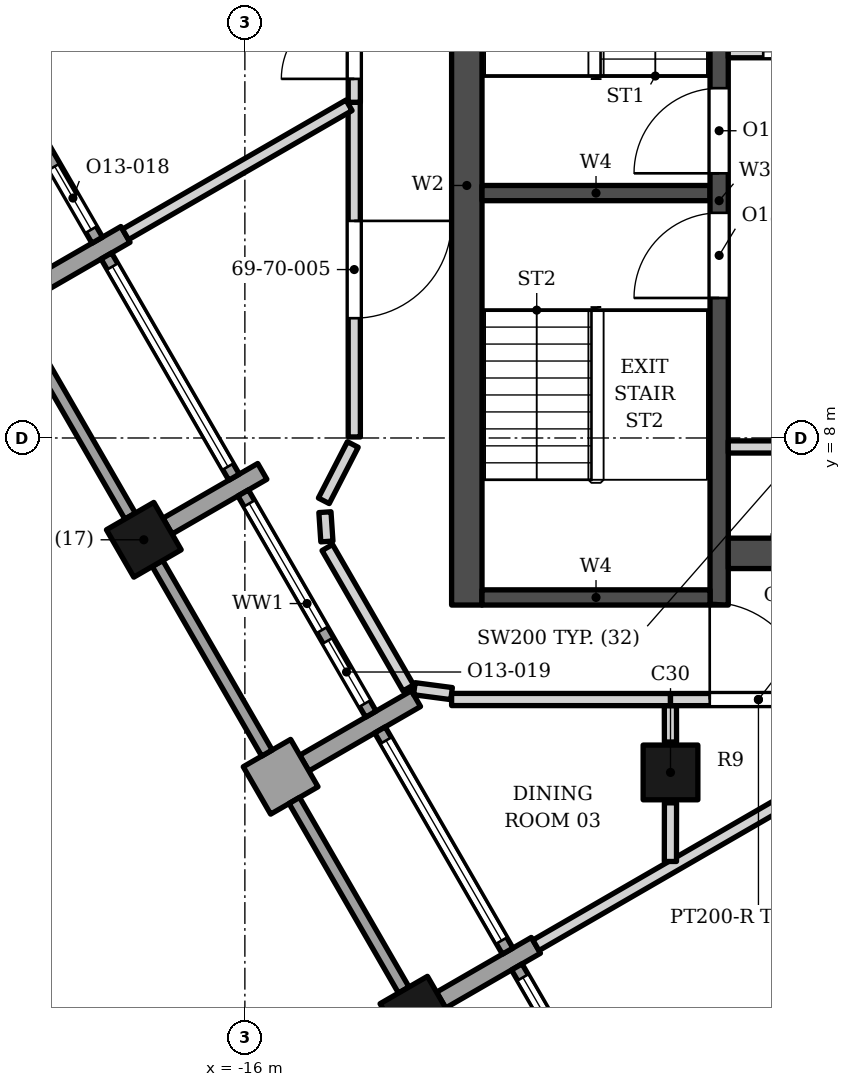
"""IFC4 building model, lengths in metres.
Left out: names, types, materials, properties, quantities, classifications, styles, units other than length and angle.
Written with IfcOpenShell. Run it as: python <this file> out.ifc"""

import sys

from ifc_helpers import new_model, si_unit, direction, frame, frame_2d, origin, origin_2d, place, context, subcontext, project, spatial, rectangle, extrude, element, fill, save


model = new_model("IFC4")
c1 = context("Model", 3, precision=1e-05, world=origin(), true_north=direction((0.0, 1.0)))
c2 = subcontext(c1, "Body", "Model", "MODEL_VIEW")
j1 = project(units=[si_unit("LENGTHUNIT", "METRE"), si_unit("PLANEANGLEUNIT", "RADIAN")], contexts=[c1])
p1 = place(None, origin())
s1 = spatial("IfcSite", under=j1, at=p1, CompositionType="ELEMENT")
p2 = place(p1, origin())
s2 = spatial("IfcBuilding", under=s1, at=p2, CompositionType="ELEMENT")
p3 = place(p2, frame((0.0, 0.0, 287.2)))
s3 = spatial("IfcBuildingStorey", under=s2, at=p3, CompositionType="ELEMENT", Elevation=287.2)
p4 = place(p3, frame((-12.35, 5.253, 0.0), z_axis=(0.0, 0.0, 1.0), x_axis=(0.0, 1.0, 0.0)))
e1 = element("IfcWall", 1, at=p4, inside=s3, PredefinedType="SHEAR", context=c2, shape_type="SweptSolid", body=[
    extrude(rectangle(XDim=13.8, YDim=0.5, at=frame_2d((6.9, 0.0))), origin(), (0.0, 0.0, 1.0), 3.9),
])
p5 = place(p3, frame((-8.2, 5.253, 0.0), z_axis=(0.0, 0.0, 1.0), x_axis=(0.0, 1.0, 0.0)))
e2 = element("IfcWall", 2, at=p5, inside=s3, PredefinedType="SHEAR", context=c2, shape_type="SweptSolid", body=[
    extrude(rectangle(XDim=13.3, YDim=0.3, at=frame_2d((6.65, 0.0))), origin(), (0.0, 0.0, 1.0), 3.9),
])
p6 = place(p5, frame((7.1, 0.0, 0.0)))
e3 = element("IfcOpeningElement", 3, at=p6, cuts=e2, PredefinedType="OPENING", context=c2, shape_type="SweptSolid", body=[
    extrude(rectangle(XDim=1.4, YDim=2.1, at=frame_2d((0.7, 1.05))), frame((0.0, 0.16, 0.0), z_axis=(0.0, -1.0, 0.0), x_axis=(1.0, 0.0, 0.0)), (0.0, 0.0, 1.0), 0.32),
])
p7 = place(p5, frame((5.05, 0.0, 0.0)))
e4 = element("IfcOpeningElement", 4, at=p7, cuts=e2, PredefinedType="OPENING", context=c2, shape_type="SweptSolid", body=[
    extrude(rectangle(XDim=1.4, YDim=2.1, at=frame_2d((0.7, 1.05))), frame((0.0, 0.16, 0.0), z_axis=(0.0, -1.0, 0.0), x_axis=(1.0, 0.0, 0.0)), (0.0, 0.0, 1.0), 0.32),
])
for number, where, z_axis, x_axis in (
    (5, (-12.1, 12.028, 0.0), (0.0, 0.0, 1.0), (1.0, 0.0, 0.0)),
    (6, (-12.1, 5.378, 0.0), (0.0, 0.0, 1.0), (1.0, 0.0, 0.0)),
):
    element("IfcWall", number, at=place(p3, frame(where, z_axis=z_axis, x_axis=x_axis)), inside=s3, PredefinedType="SHEAR", context=c2, shape_type="SweptSolid", body=[
        extrude(rectangle(XDim=3.75, YDim=0.25, at=frame_2d((1.875, 0.0))), origin(), (0.0, 0.0, 1.0), 3.9),
    ])
p8 = place(p3, frame((-8.05, 6.103, 0.0), z_axis=(0.0, 0.0, 1.0), x_axis=(1.0, 0.0, 0.0)))
e7 = element("IfcWall", 7, at=p8, inside=s3, PredefinedType="SHEAR", context=c2, shape_type="SweptSolid", body=[
    extrude(rectangle(XDim=7.05, YDim=0.5, at=frame_2d((3.525, 0.0))), origin(), (0.0, 0.0, 1.0), 3.9),
])
p9 = place(p8, frame((0.825, 0.0, 0.0)))
e8 = element("IfcOpeningElement", 8, at=p9, cuts=e7, PredefinedType="OPENING", context=c2, shape_type="SweptSolid", body=[
    extrude(rectangle(XDim=0.9, YDim=2.1, at=frame_2d((0.45, 1.05))), frame((0.0, 0.26, 0.0), z_axis=(0.0, -1.0, 0.0), x_axis=(1.0, 0.0, 0.0)), (0.0, 0.0, 1.0), 0.52),
])
for number, where, z_axis, x_axis in (
    (9, (-9.0, 2.5, 0.0), (0.0, 0.0, 1.0), (1.0, 0.0, 0.0)),
    (10, (-17.662, 6.326, 0.0), (0.0, 0.0, 1.0), (0.5, -0.866, 0.0)),
    (11, (-13.162, -1.468, 0.0), (0.0, 0.0, 1.0), (0.5, -0.866, 0.0)),
):
    element("IfcColumn", number, at=place(p3, frame(where, z_axis=z_axis, x_axis=x_axis)), inside=s3, PredefinedType="COLUMN", context=c2, shape_type="SweptSolid", body=[
        extrude(rectangle(XDim=0.9, YDim=0.9, at=origin_2d()), origin(), (0.0, 0.0, 1.0), 3.9),
    ])
p10 = place(p3, frame((-17.963, 11.348, 0.0), z_axis=(0.0, 0.0, 1.0), x_axis=(-0.866047807691, -0.499961193289, 0.0)))
e12 = element("IfcWall", 12, at=p10, inside=s3, PredefinedType="SOLIDWALL", context=c2, shape_type="SweptSolid", body=[
    extrude(rectangle(XDim=1.8, YDim=0.3, at=frame_2d((0.9, 0.0))), origin(), (0.0, 0.0, 1.0), 3.0),
])
p11 = place(p3, frame((-17.272, 6.551, 0.0), z_axis=(0.0, 0.0, 1.0), x_axis=(0.865989075817, 0.500062916607, 0.0)))
e13 = element("IfcWall", 13, at=p11, inside=s3, PredefinedType="SOLIDWALL", context=c2, shape_type="SweptSolid", body=[
    extrude(rectangle(XDim=1.8, YDim=0.3, at=frame_2d((0.9, 0.0))), origin(), (0.0, 0.0, 1.0), 2.95),
])
p12 = place(p3, frame((-15.022, 2.654, 0.0), z_axis=(0.0, 0.0, 1.0), x_axis=(-0.865896406789, -0.500223362819, 0.0)))
e14 = element("IfcWall", 14, at=p12, inside=s3, PredefinedType="SOLIDWALL", context=c2, shape_type="SweptSolid", body=[
    extrude(rectangle(XDim=0.9, YDim=0.9, at=frame_2d((0.45, 0.0))), origin(), (0.0, 0.0, 1.0), 3.0),
])
p13 = place(p3, frame((-13.186, 3.714, 0.0), z_axis=(0.0, 0.0, 1.0), x_axis=(-0.866059014716, -0.499941779639, 0.0)))
e15 = element("IfcWall", 15, at=p13, inside=s3, PredefinedType="SOLIDWALL", context=c2, shape_type="SweptSolid", body=[
    extrude(rectangle(XDim=2.12, YDim=0.3, at=frame_2d((1.06, 0.0))), origin(), (0.0, 0.0, 1.0), 3.0),
])
p14 = place(p3, frame((-12.772, -1.243, 0.0), z_axis=(0.0, 0.0, 1.0), x_axis=(0.866013897511, 0.50001992892, 0.0)))
e16 = element("IfcWall", 16, at=p14, inside=s3, PredefinedType="SOLIDWALL", context=c2, shape_type="SweptSolid", body=[
    extrude(rectangle(XDim=1.8, YDim=0.3, at=frame_2d((0.9, 0.0))), origin(), (0.0, 0.0, 1.0), 3.0),
])
p15 = place(p3, frame((-20.528, 14.89, 0.0), z_axis=(0.0, 0.0, 1.0), x_axis=(0.500027713859, -0.866009402589, 0.0)))
e17 = element("IfcWall", 17, at=p15, inside=s3, PredefinedType="ELEMENTEDWALL", context=c2, shape_type="SweptSolid", body=[
    extrude(rectangle(XDim=4.2, YDim=0.2, at=frame_2d((2.1, 0.0))), origin(), (0.0, 0.0, 1.0), 3.0),
])
p16 = place(p15, frame((0.2, 0.0, 0.45)))
e18 = element("IfcOpeningElement", 18, at=p16, cuts=e17, PredefinedType="OPENING", context=c2, shape_type="SweptSolid", body=[
    extrude(rectangle(XDim=2.4, YDim=2.25, at=frame_2d((1.2, 1.125))), frame((0.0, 0.11, 0.0), z_axis=(0.0, -1.0, 0.0), x_axis=(1.0, 0.0, 0.0)), (0.0, 0.0, 1.0), 0.22),
])
p17 = place(p15, frame((2.8, 0.0, 0.0)))
e19 = element("IfcOpeningElement", 19, at=p17, cuts=e17, PredefinedType="OPENING", context=c2, shape_type="SweptSolid", body=[
    extrude(rectangle(XDim=1.2, YDim=2.7, at=frame_2d((0.6, 1.35))), frame((0.0, 0.11, 0.0), z_axis=(0.0, -1.0, 0.0), x_axis=(1.0, 0.0, 0.0)), (0.0, 0.0, 1.0), 0.22),
])
p18 = place(p3, frame((-19.687, 9.833, 0.0), z_axis=(0.0, 0.0, 1.0), x_axis=(0.499961193289, -0.866047807691, 0.0)))
e20 = element("IfcWall", 20, at=p18, inside=s3, PredefinedType="SOLIDWALL", context=c2, shape_type="SweptSolid", body=[
    extrude(rectangle(XDim=3.6, YDim=0.2, at=frame_2d((1.8, 0.0))), origin(), (0.0, 0.0, 1.0), 3.0),
])
p19 = place(p3, frame((-18.278, 10.993, 0.0), z_axis=(0.0, 0.0, 1.0), x_axis=(0.500002543286, -0.866023935413, 0.0)))
e21 = element("IfcWall", 21, at=p19, inside=s3, PredefinedType="ELEMENTEDWALL", context=c2, shape_type="SweptSolid", body=[
    extrude(rectangle(XDim=4.2, YDim=0.2, at=frame_2d((2.1, 0.0))), origin(), (0.0, 0.0, 1.0), 3.0),
])
p20 = place(p19, frame((0.2, 0.0, 0.45)))
e22 = element("IfcOpeningElement", 22, at=p20, cuts=e21, PredefinedType="OPENING", context=c2, shape_type="SweptSolid", body=[
    extrude(rectangle(XDim=3.8, YDim=2.25, at=frame_2d((1.9, 1.125))), frame((0.0, 0.11, 0.0), z_axis=(0.0, -1.0, 0.0), x_axis=(1.0, 0.0, 0.0)), (0.0, 0.0, 1.0), 0.22),
])
p21 = place(p3, frame((-17.437, 5.936, 0.0), z_axis=(0.0, 0.0, 1.0), x_axis=(0.499961193289, -0.866047807691, 0.0)))
e23 = element("IfcWall", 23, at=p21, inside=s3, PredefinedType="SOLIDWALL", context=c2, shape_type="SweptSolid", body=[
    extrude(rectangle(XDim=3.6, YDim=0.2, at=frame_2d((1.8, 0.0))), origin(), (0.0, 0.0, 1.0), 3.0),
])
p22 = place(p3, frame((-16.028, 7.096, 0.0), z_axis=(0.0, 0.0, 1.0), x_axis=(0.500027713859, -0.866009402589, 0.0)))
e24 = element("IfcWall", 24, at=p22, inside=s3, PredefinedType="ELEMENTEDWALL", context=c2, shape_type="SweptSolid", body=[
    extrude(rectangle(XDim=4.2, YDim=0.2, at=frame_2d((2.1, 0.0))), origin(), (0.0, 0.0, 1.0), 2.95),
])
p23 = place(p22, frame((0.2, 0.0, 0.45)))
e25 = element("IfcOpeningElement", 25, at=p23, cuts=e24, PredefinedType="OPENING", context=c2, shape_type="SweptSolid", body=[
    extrude(rectangle(XDim=2.4, YDim=2.25, at=frame_2d((1.2, 1.125))), frame((0.0, 0.11, 0.0), z_axis=(0.0, -1.0, 0.0), x_axis=(1.0, 0.0, 0.0)), (0.0, 0.0, 1.0), 0.22),
])
p24 = place(p22, frame((2.8, 0.0, 0.0)))
e26 = element("IfcOpeningElement", 26, at=p24, cuts=e24, PredefinedType="OPENING", context=c2, shape_type="SweptSolid", body=[
    extrude(rectangle(XDim=1.2, YDim=2.7, at=frame_2d((0.6, 1.35))), frame((0.0, 0.11, 0.0), z_axis=(0.0, -1.0, 0.0), x_axis=(1.0, 0.0, 0.0)), (0.0, 0.0, 1.0), 0.22),
])
p25 = place(p3, frame((-15.187, 2.039, 0.0), z_axis=(0.0, 0.0, 1.0), x_axis=(0.499961193289, -0.866047807691, 0.0)))
e27 = element("IfcWall", 27, at=p25, inside=s3, PredefinedType="SOLIDWALL", context=c2, shape_type="SweptSolid", body=[
    extrude(rectangle(XDim=3.6, YDim=0.2, at=frame_2d((1.8, 0.0))), origin(), (0.0, 0.0, 1.0), 3.0),
])
p26 = place(p3, frame((-13.778, 3.199, 0.0), z_axis=(0.0, 0.0, 1.0), x_axis=(0.500027713859, -0.866009402589, 0.0)))
e28 = element("IfcWall", 28, at=p26, inside=s3, PredefinedType="ELEMENTEDWALL", context=c2, shape_type="SweptSolid", body=[
    extrude(rectangle(XDim=4.2, YDim=0.2, at=frame_2d((2.1, 0.0))), origin(), (0.0, 0.0, 1.0), 3.0),
])
p27 = place(p26, frame((0.2, 0.0, 0.45)))
e29 = element("IfcOpeningElement", 29, at=p27, cuts=e28, PredefinedType="OPENING", context=c2, shape_type="SweptSolid", body=[
    extrude(rectangle(XDim=3.8, YDim=2.25, at=frame_2d((1.9, 1.125))), frame((0.0, 0.11, 0.0), z_axis=(0.0, -1.0, 0.0), x_axis=(1.0, 0.0, 0.0)), (0.0, 0.0, 1.0), 0.22),
])
p28 = place(p3, frame((-11.528, -0.698, 0.0), z_axis=(0.0, 0.0, 1.0), x_axis=(0.500002543286, -0.866023935413, 0.0)))
e30 = element("IfcWall", 30, at=p28, inside=s3, PredefinedType="ELEMENTEDWALL", context=c2, shape_type="SweptSolid", body=[
    extrude(rectangle(XDim=4.2, YDim=0.2, at=frame_2d((2.1, 0.0))), origin(), (0.0, 0.0, 1.0), 3.0),
])
p29 = place(p28, frame((0.2, 0.0, 0.45)))
e31 = element("IfcOpeningElement", 31, at=p29, cuts=e30, PredefinedType="OPENING", context=c2, shape_type="SweptSolid", body=[
    extrude(rectangle(XDim=2.4, YDim=2.25, at=frame_2d((1.2, 1.125))), frame((0.0, 0.11, 0.0), z_axis=(0.0, -1.0, 0.0), x_axis=(1.0, 0.0, 0.0)), (0.0, 0.0, 1.0), 0.22),
])
p30 = place(p28, frame((2.8, 0.0, 0.0)))
e32 = element("IfcOpeningElement", 32, at=p30, cuts=e30, PredefinedType="OPENING", context=c2, shape_type="SweptSolid", body=[
    extrude(rectangle(XDim=1.2, YDim=2.7, at=frame_2d((0.6, 1.35))), frame((0.0, 0.11, 0.0), z_axis=(0.0, -1.0, 0.0), x_axis=(1.0, 0.0, 0.0)), (0.0, 0.0, 1.0), 0.22),
])
p31 = place(p3, frame((-8.05, 7.853, 0.0), z_axis=(0.0, 0.0, 1.0), x_axis=(1.0, 0.0, 0.0)))
e33 = element("IfcWall", 33, at=p31, inside=s3, PredefinedType="SOLIDWALL", context=c2, shape_type="SweptSolid", body=[
    extrude(rectangle(XDim=2.5, YDim=0.2, at=frame_2d((1.25, 0.0))), origin(), (0.0, 0.0, 1.0), 3.73),
])
p32 = place(p3, frame((-8.05, 14.353, 0.0), z_axis=(0.0, 0.0, 1.0), x_axis=(1.0, 0.0, 0.0)))
e34 = element("IfcWall", 34, at=p32, inside=s3, PredefinedType="SOLIDWALL", context=c2, shape_type="SweptSolid", body=[
    extrude(rectangle(XDim=2.35, YDim=0.2, at=frame_2d((1.175, 0.0))), origin(), (0.0, 0.0, 1.0), 3.73),
])
p33 = place(p32, frame((0.575, 0.0, 0.0)))
e35 = element("IfcOpeningElement", 35, at=p33, cuts=e34, PredefinedType="OPENING", context=c2, shape_type="SweptSolid", body=[
    extrude(rectangle(XDim=1.2, YDim=2.1, at=frame_2d((0.6, 1.05))), frame((0.0, 0.11, 0.0), z_axis=(0.0, -1.0, 0.0), x_axis=(1.0, 0.0, 0.0)), (0.0, 0.0, 1.0), 0.22),
])
p34 = place(p3, frame((-11.214, -0.343, 0.0), z_axis=(0.0, 0.0, 1.0), x_axis=(0.86573436217, 0.500503760384, 0.0)))
e36 = element("IfcWall", 36, at=p34, inside=s3, PredefinedType="PARTITIONING", context=c2, shape_type="SweptSolid", body=[
    extrude(rectangle(XDim=7.05, YDim=0.2, at=frame_2d((3.525, 0.0))), origin(), (0.0, 0.0, 1.0), 2.742),
])
p35 = place(p3, frame((-9.002, 1.036, 0.0), z_axis=(0.0, 0.0, 1.0), x_axis=(0.001518985589, 0.999998846341, 0.0)))
e37 = element("IfcWall", 37, at=p35, inside=s3, PredefinedType="PARTITIONING", context=c2, shape_type="SweptSolid", body=[
    extrude(rectangle(XDim=0.964, YDim=0.2, at=frame_2d((0.482, 0.0))), origin(), (0.0, 0.0, 1.0), 3.128),
])
p36 = place(p3, frame((-9.002, 3.6, 0.0), z_axis=(0.0, 0.0, 1.0), x_axis=(0.002442989453, -0.999997015897, 0.0)))
e38 = element("IfcWall", 38, at=p36, inside=s3, PredefinedType="PARTITIONING", context=c2, shape_type="SweptSolid", body=[
    extrude(rectangle(XDim=0.6, YDim=0.2, at=frame_2d((0.3, 0.0))), origin(), (0.0, 0.0, 1.0), 3.332),
])
p37 = place(p3, frame((-12.6, 3.699, 0.0), z_axis=(0.0, 0.0, 1.0), x_axis=(0.999999917209, -0.000406917565, 0.0)))
e39 = element("IfcWall", 39, at=p37, inside=s3, PredefinedType="PARTITIONING", context=c2, shape_type="SweptSolid", body=[
    extrude(rectangle(XDim=3.6, YDim=0.2, at=frame_2d((1.8, 0.0))), origin(), (0.0, 0.0, 1.0), 3.73),
])
p38 = place(p3, frame((-9.0, 3.698, 0.0), z_axis=(0.0, 0.0, 1.0), x_axis=(0.999999871794, 0.000506371781, 0.0)))
e40 = element("IfcWall", 40, at=p38, inside=s3, PredefinedType="PARTITIONING", context=c2, shape_type="SweptSolid", body=[
    extrude(rectangle(XDim=2.893, YDim=0.2, at=frame_2d((1.446, 0.0))), origin(), (0.0, 0.0, 1.0), 3.73),
])
p39 = place(p38, frame((0.646, 0.0, 0.0)))
e41 = element("IfcOpeningElement", 41, at=p39, cuts=e40, PredefinedType="OPENING", context=c2, shape_type="SweptSolid", body=[
    extrude(rectangle(XDim=1.6, YDim=2.1, at=frame_2d((0.8, 1.05))), frame((0.0, 0.11, 0.0), z_axis=(0.0, -1.0, 0.0), x_axis=(1.0, 0.0, 0.0)), (0.0, 0.0, 1.0), 0.22),
])
p40 = place(p3, frame((-13.212, 3.877, 0.0), z_axis=(0.0, 0.0, 1.0), x_axis=(0.991440824405, -0.130556852376, 0.0)))
e42 = element("IfcWall", 42, at=p40, inside=s3, PredefinedType="PARTITIONING", context=c2, shape_type="SweptSolid", body=[
    extrude(rectangle(XDim=0.617, YDim=0.2, at=frame_2d((0.309, 0.0))), origin(), (0.0, 0.0, 1.0), 3.73),
])
p41 = place(p3, frame((-14.645, 6.199, 0.0), z_axis=(0.0, 0.0, 1.0), x_axis=(0.499999897272, -0.866025463095, 0.0)))
e43 = element("IfcWall", 43, at=p41, inside=s3, PredefinedType="PARTITIONING", context=c2, shape_type="SweptSolid", body=[
    extrude(rectangle(XDim=2.666, YDim=0.2, at=frame_2d((1.333, 0.0))), origin(), (0.0, 0.0, 1.0), 2.95),
])
p42 = place(p3, frame((-14.683, 6.78, 0.0), z_axis=(0.0, 0.0, 1.0), x_axis=(0.066787663234, -0.997767211347, 0.0)))
e44 = element("IfcWall", 44, at=p42, inside=s3, PredefinedType="PARTITIONING", context=c2, shape_type="SweptSolid", body=[
    extrude(rectangle(XDim=0.482, YDim=0.2, at=frame_2d((0.241, 0.0))), origin(), (0.0, 0.0, 1.0), 2.95),
])
p43 = place(p3, frame((-14.702, 6.967, 0.0), z_axis=(0.0, 0.0, 1.0), x_axis=(0.457967820871, 0.888968770569, 0.0)))
e45 = element("IfcWall", 45, at=p43, inside=s3, PredefinedType="PARTITIONING", context=c2, shape_type="SweptSolid", body=[
    extrude(rectangle(XDim=1.041, YDim=0.2, at=frame_2d((0.521, 0.0))), origin(), (0.0, 0.0, 1.0), 3.73),
])
p44 = place(p3, frame((-14.202, 13.52, 0.0), z_axis=(0.0, 0.0, 1.0), x_axis=(0.000266228859, -0.999999964561, 0.0)))
e46 = element("IfcWall", 46, at=p44, inside=s3, PredefinedType="PARTITIONING", context=c2, shape_type="SweptSolid", body=[
    extrude(rectangle(XDim=5.502, YDim=0.2, at=frame_2d((2.751, 0.0))), origin(), (0.0, 0.0, 1.0), 3.73),
])
p45 = place(p44, frame((1.95, 0.0, 0.0)))
e47 = element("IfcOpeningElement", 47, at=p45, cuts=e46, PredefinedType="OPENING", context=c2, shape_type="SweptSolid", body=[
    extrude(rectangle(XDim=1.6, YDim=2.1, at=frame_2d((0.8, 1.05))), frame((0.0, 0.11, 0.0), z_axis=(0.0, -1.0, 0.0), x_axis=(1.0, 0.0, 0.0)), (0.0, 0.0, 1.0), 0.22),
])
p46 = place(p3, frame((-17.963, 11.348, 0.0), z_axis=(0.0, 0.0, 1.0), x_axis=(0.866018937599, 0.500011199594, 0.0)))
e48 = element("IfcWall", 48, at=p46, inside=s3, PredefinedType="PARTITIONING", context=c2, shape_type="SweptSolid", body=[
    extrude(rectangle(XDim=4.245, YDim=0.2, at=frame_2d((2.123, 0.0))), origin(), (0.0, 0.0, 1.0), 3.128),
])
p47 = place(p3, frame((-14.2, 13.521, 0.0), z_axis=(0.0, 0.0, 1.0), x_axis=(0.0, 1.0, 0.0)))
e49 = element("IfcWall", 49, at=p47, inside=s3, PredefinedType="PARTITIONING", context=c2, shape_type="SweptSolid", body=[
    extrude(rectangle(XDim=1.772, YDim=0.2, at=frame_2d((0.886, 0.0))), origin(), (0.0, 0.0, 1.0), 3.73),
])
p48 = place(p47, frame((0.385, 0.0, 0.0)))
e50 = element("IfcOpeningElement", 50, at=p48, cuts=e49, PredefinedType="OPENING", context=c2, shape_type="SweptSolid", body=[
    extrude(rectangle(XDim=1.2, YDim=2.4, at=frame_2d((0.6, 1.2))), frame((0.0, 0.11, 0.0), z_axis=(0.0, -1.0, 0.0), x_axis=(1.0, 0.0, 0.0)), (0.0, 0.0, 1.0), 0.22),
])
p49 = place(p17, origin())
e51 = element("IfcDoor", 51, at=p49, inside=s3, OperationType="SINGLE_SWING_LEFT", PredefinedType="DOOR", context=c2, shape_type="SweptSolid", body=[
    extrude(rectangle(XDim=1.2, YDim=2.7, at=frame_2d((0.6, 1.35))), frame((0.0, 0.025, 0.0), z_axis=(0.0, -1.0, 0.0), x_axis=(1.0, 0.0, 0.0)), (0.0, 0.0, 1.0), 0.05),
])
fill(e19, e51)
p50 = place(p20, origin())
e52 = element("IfcWindow", 52, at=p50, inside=s3, PartitioningType="SINGLE_PANEL", PredefinedType="WINDOW", context=c2, shape_type="SweptSolid", body=[
    extrude(rectangle(XDim=3.8, YDim=2.25, at=frame_2d((1.9, 1.125))), frame((0.0, 0.03, 0.0), z_axis=(0.0, -1.0, 0.0), x_axis=(1.0, 0.0, 0.0)), (0.0, 0.0, 1.0), 0.06),
])
fill(e22, e52)
p51 = place(p23, origin())
e53 = element("IfcWindow", 53, at=p51, inside=s3, PartitioningType="SINGLE_PANEL", PredefinedType="WINDOW", context=c2, shape_type="SweptSolid", body=[
    extrude(rectangle(XDim=2.4, YDim=2.25, at=frame_2d((1.2, 1.125))), frame((0.0, 0.03, 0.0), z_axis=(0.0, -1.0, 0.0), x_axis=(1.0, 0.0, 0.0)), (0.0, 0.0, 1.0), 0.06),
])
fill(e25, e53)
p52 = place(p24, origin())
e54 = element("IfcDoor", 54, at=p52, inside=s3, OperationType="SINGLE_SWING_LEFT", PredefinedType="DOOR", context=c2, shape_type="SweptSolid", body=[
    extrude(rectangle(XDim=1.2, YDim=2.7, at=frame_2d((0.6, 1.35))), frame((0.0, 0.025, 0.0), z_axis=(0.0, -1.0, 0.0), x_axis=(1.0, 0.0, 0.0)), (0.0, 0.0, 1.0), 0.05),
])
fill(e26, e54)
p53 = place(p27, origin())
e55 = element("IfcWindow", 55, at=p53, inside=s3, PartitioningType="SINGLE_PANEL", PredefinedType="WINDOW", context=c2, shape_type="SweptSolid", body=[
    extrude(rectangle(XDim=3.8, YDim=2.25, at=frame_2d((1.9, 1.125))), frame((0.0, 0.03, 0.0), z_axis=(0.0, -1.0, 0.0), x_axis=(1.0, 0.0, 0.0)), (0.0, 0.0, 1.0), 0.06),
])
fill(e29, e55)
p54 = place(p29, origin())
e56 = element("IfcWindow", 56, at=p54, inside=s3, PartitioningType="SINGLE_PANEL", PredefinedType="WINDOW", context=c2, shape_type="SweptSolid", body=[
    extrude(rectangle(XDim=2.4, YDim=2.25, at=frame_2d((1.2, 1.125))), frame((0.0, 0.03, 0.0), z_axis=(0.0, -1.0, 0.0), x_axis=(1.0, 0.0, 0.0)), (0.0, 0.0, 1.0), 0.06),
])
fill(e31, e56)
p55 = place(p33, origin())
e57 = element("IfcDoor", 57, at=p55, inside=s3, OperationType="DOUBLE_DOOR_SLIDING", PredefinedType="DOOR", context=c2, shape_type="SweptSolid", body=[
    extrude(rectangle(XDim=1.2, YDim=2.1, at=frame_2d((0.6, 1.05))), frame((0.0, 0.025, 0.0), z_axis=(0.0, -1.0, 0.0), x_axis=(1.0, 0.0, 0.0)), (0.0, 0.0, 1.0), 0.05),
])
fill(e35, e57)
p56 = place(p6, origin())
e58 = element("IfcDoor", 58, at=p56, inside=s3, OperationType="SINGLE_SWING_LEFT", PredefinedType="DOOR", context=c2, shape_type="SweptSolid", body=[
    extrude(rectangle(XDim=1.4, YDim=2.1, at=frame_2d((0.7, 1.05))), frame((0.0, 0.025, 0.0), z_axis=(0.0, -1.0, 0.0), x_axis=(1.0, 0.0, 0.0)), (0.0, 0.0, 1.0), 0.05),
])
fill(e3, e58)
p57 = place(p7, origin())
e59 = element("IfcDoor", 59, at=p57, inside=s3, OperationType="SINGLE_SWING_LEFT", PredefinedType="DOOR", context=c2, shape_type="SweptSolid", body=[
    extrude(rectangle(XDim=1.4, YDim=2.1, at=frame_2d((0.7, 1.05))), frame((0.0, 0.025, 0.0), z_axis=(0.0, -1.0, 0.0), x_axis=(1.0, 0.0, 0.0)), (0.0, 0.0, 1.0), 0.05),
])
fill(e4, e59)
p58 = place(p39, origin())
e60 = element("IfcDoor", 60, at=p58, inside=s3, OperationType="DOUBLE_DOOR_SINGLE_SWING", PredefinedType="DOOR", context=c2, shape_type="SweptSolid", body=[
    extrude(rectangle(XDim=1.6, YDim=2.1, at=frame_2d((0.8, 1.05))), frame((0.0, 0.025, 0.0), z_axis=(0.0, -1.0, 0.0), x_axis=(1.0, 0.0, 0.0)), (0.0, 0.0, 1.0), 0.05),
])
fill(e41, e60)
p59 = place(p45, origin())
e61 = element("IfcDoor", 61, at=p59, inside=s3, OperationType="DOUBLE_DOOR_SINGLE_SWING", PredefinedType="DOOR", context=c2, shape_type="SweptSolid", body=[
    extrude(rectangle(XDim=1.6, YDim=2.1, at=frame_2d((0.8, 1.05))), frame((0.0, 0.025, 0.0), z_axis=(0.0, -1.0, 0.0), x_axis=(1.0, 0.0, 0.0)), (0.0, 0.0, 1.0), 0.05),
])
fill(e47, e61)
p60 = place(p48, origin())
e62 = element("IfcDoor", 62, at=p60, inside=s3, OperationType="SINGLE_SWING_LEFT", PredefinedType="DOOR", context=c2, shape_type="SweptSolid", body=[
    extrude(rectangle(XDim=1.2, YDim=2.4, at=frame_2d((0.6, 1.2))), frame((0.0, 0.025, 0.0), z_axis=(0.0, -1.0, 0.0), x_axis=(1.0, 0.0, 0.0)), (0.0, 0.0, 1.0), 0.05),
])
fill(e50, e62)
save(model, sys.argv[1])
